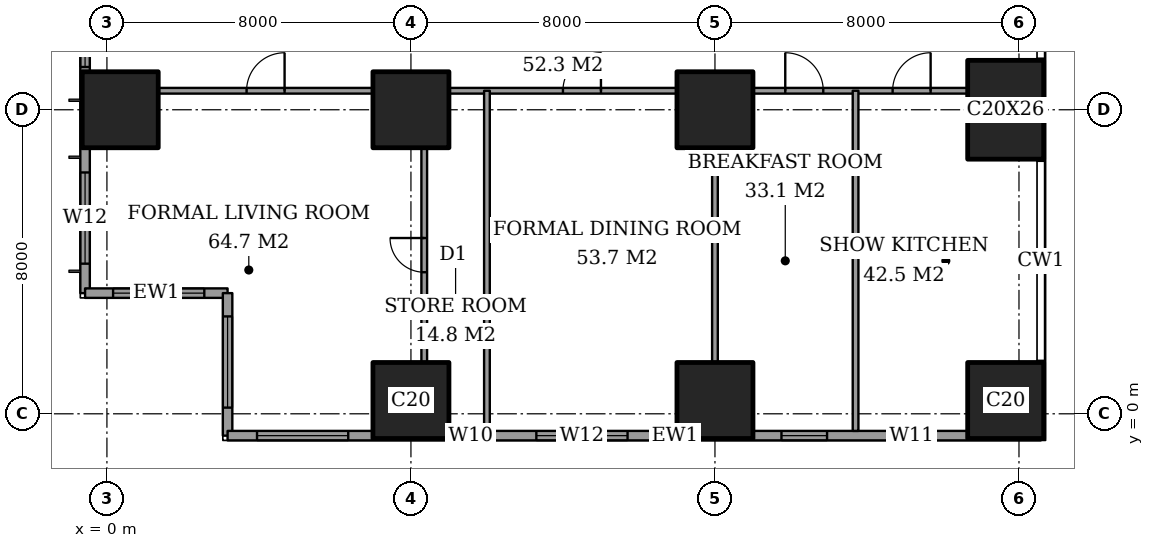
"""IFC4 building model, lengths in metres.
Left out: names, types, materials, properties, quantities, classifications, styles, units other than length and angle.
Written with IfcOpenShell. Run it as: python <this file> out.ifc"""

import sys

from ifc_helpers import new_model, si_unit, direction, frame, frame_2d, origin, origin_2d, place, context, subcontext, project, spatial, rectangle, extrude, element, fill, save


model = new_model("IFC4")
c1 = context("Model", 3, precision=1e-05, world=origin(), true_north=direction((0.0, 1.0)))
c2 = subcontext(c1, "Body", "Model", "MODEL_VIEW")
j1 = project(units=[si_unit("LENGTHUNIT", "METRE"), si_unit("PLANEANGLEUNIT", "RADIAN")], contexts=[c1])
p1 = place(None, origin())
s1 = spatial("IfcSite", under=j1, at=p1, CompositionType="ELEMENT")
p2 = place(p1, origin())
s2 = spatial("IfcBuilding", under=s1, at=p2, CompositionType="ELEMENT")
p3 = place(p2, frame((0.0, 0.0, 121.4)))
s3 = spatial("IfcBuildingStorey", under=s2, at=p3, CompositionType="ELEMENT", Elevation=121.4)
for number, where, z_axis, x_axis in (
    (1, (0.35, 8.0, 0.0), (0.0, 0.0, 1.0), (1.0, 0.0, 0.0)),
    (2, (8.0, 0.35, 0.0), (0.0, 0.0, 1.0), (1.0, 0.0, 0.0)),
    (3, (8.0, 8.0, 0.0), (0.0, 0.0, 1.0), (1.0, 0.0, 0.0)),
    (4, (16.0, 0.35, 0.0), (0.0, 0.0, 1.0), (1.0, 0.0, 0.0)),
    (5, (16.0, 8.0, 0.0), (0.0, 0.0, 1.0), (1.0, 0.0, 0.0)),
    (6, (23.65, 0.35, 0.0), (0.0, 0.0, 1.0), (1.0, 0.0, 0.0)),
):
    element("IfcColumn", number, at=place(p3, frame(where, z_axis=z_axis, x_axis=x_axis)), inside=s3, PredefinedType="COLUMN", context=c2, shape_type="SweptSolid", body=[
        extrude(rectangle(XDim=2.0, YDim=2.0, at=origin_2d()), origin(), (0.0, 0.0, 1.0), 3.6),
    ])
p4 = place(p3, frame((23.65, 8.0, 0.0), z_axis=(0.0, 0.0, 1.0), x_axis=(1.0, 0.0, 0.0)))
e7 = element("IfcColumn", 7, at=p4, inside=s3, PredefinedType="COLUMN", context=c2, shape_type="SweptSolid", body=[
    extrude(rectangle(XDim=2.0, YDim=2.6, at=origin_2d()), origin(), (0.0, 0.0, 1.0), 3.6),
])
p5 = place(p3, frame((-0.575, 44.825, 0.0), z_axis=(0.0, 0.0, 1.0), x_axis=(0.0, -1.0, 0.0)))
e8 = element("IfcWall", 8, at=p5, inside=s3, PredefinedType="SOLIDWALL", context=c2, shape_type="SweptSolid", body=[
    extrude(rectangle(XDim=41.65, YDim=0.25, at=frame_2d((20.825, 0.0))), origin(), (0.0, 0.0, 1.0), 3.6),
])
p6 = place(p5, frame((0.775, 0.0, 0.4)))
e9 = element("IfcOpeningElement", 9, at=p6, cuts=e8, PredefinedType="OPENING", context=c2, shape_type="SweptSolid", body=[
    extrude(rectangle(XDim=2.4, YDim=2.2, at=frame_2d((1.2, 1.1))), frame((0.0, 0.135, 0.0), z_axis=(0.0, -1.0, 0.0), x_axis=(1.0, 0.0, 0.0)), (0.0, 0.0, 1.0), 0.27),
])
p7 = place(p5, frame((6.1, 0.0, 0.4)))
e10 = element("IfcOpeningElement", 10, at=p7, cuts=e8, PredefinedType="OPENING", context=c2, shape_type="SweptSolid", body=[
    extrude(rectangle(XDim=1.2, YDim=2.2, at=frame_2d((0.6, 1.1))), frame((0.0, 0.135, 0.0), z_axis=(0.0, -1.0, 0.0), x_axis=(1.0, 0.0, 0.0)), (0.0, 0.0, 1.0), 0.27),
])
p8 = place(p5, frame((8.225, 0.0, 0.4)))
e11 = element("IfcOpeningElement", 11, at=p8, cuts=e8, PredefinedType="OPENING", context=c2, shape_type="SweptSolid", body=[
    extrude(rectangle(XDim=2.4, YDim=2.2, at=frame_2d((1.2, 1.1))), frame((0.0, 0.135, 0.0), z_axis=(0.0, -1.0, 0.0), x_axis=(1.0, 0.0, 0.0)), (0.0, 0.0, 1.0), 0.27),
])
p9 = place(p5, frame((15.625, 0.0, 0.4)))
e12 = element("IfcOpeningElement", 12, at=p9, cuts=e8, PredefinedType="OPENING", context=c2, shape_type="SweptSolid", body=[
    extrude(rectangle(XDim=2.4, YDim=2.2, at=frame_2d((1.2, 1.1))), frame((0.0, 0.135, 0.0), z_axis=(0.0, -1.0, 0.0), x_axis=(1.0, 0.0, 0.0)), (0.0, 0.0, 1.0), 0.27),
])
p10 = place(p5, frame((23.625, 0.0, 0.4)))
e13 = element("IfcOpeningElement", 13, at=p10, cuts=e8, PredefinedType="OPENING", context=c2, shape_type="SweptSolid", body=[
    extrude(rectangle(XDim=2.4, YDim=2.2, at=frame_2d((1.2, 1.1))), frame((0.0, 0.135, 0.0), z_axis=(0.0, -1.0, 0.0), x_axis=(1.0, 0.0, 0.0)), (0.0, 0.0, 1.0), 0.27),
])
p11 = place(p5, frame((30.825, 0.0, 0.4)))
e14 = element("IfcOpeningElement", 14, at=p11, cuts=e8, PredefinedType="OPENING", context=c2, shape_type="SweptSolid", body=[
    extrude(rectangle(XDim=2.4, YDim=2.2, at=frame_2d((1.2, 1.1))), frame((0.0, 0.135, 0.0), z_axis=(0.0, -1.0, 0.0), x_axis=(1.0, 0.0, 0.0)), (0.0, 0.0, 1.0), 0.27),
])
p12 = place(p5, frame((34.5, 0.0, 0.4)))
e15 = element("IfcOpeningElement", 15, at=p12, cuts=e8, PredefinedType="OPENING", context=c2, shape_type="SweptSolid", body=[
    extrude(rectangle(XDim=1.2, YDim=2.2, at=frame_2d((0.6, 1.1))), frame((0.0, 0.135, 0.0), z_axis=(0.0, -1.0, 0.0), x_axis=(1.0, 0.0, 0.0)), (0.0, 0.0, 1.0), 0.27),
])
p13 = place(p5, frame((38.475, 0.0, 0.4)))
e16 = element("IfcOpeningElement", 16, at=p13, cuts=e8, PredefinedType="OPENING", context=c2, shape_type="SweptSolid", body=[
    extrude(rectangle(XDim=2.4, YDim=2.2, at=frame_2d((1.2, 1.1))), frame((0.0, 0.135, 0.0), z_axis=(0.0, -1.0, 0.0), x_axis=(1.0, 0.0, 0.0)), (0.0, 0.0, 1.0), 0.27),
])
p14 = place(p3, frame((-0.575, 3.175, 0.0), z_axis=(0.0, 0.0, 1.0), x_axis=(1.0, 0.0, 0.0)))
e17 = element("IfcWall", 17, at=p14, inside=s3, PredefinedType="SOLIDWALL", context=c2, shape_type="SweptSolid", body=[
    extrude(rectangle(XDim=3.75, YDim=0.25, at=frame_2d((1.875, 0.0))), origin(), (0.0, 0.0, 1.0), 3.6),
])
p15 = place(p14, frame((0.738, 0.0, 0.4)))
e18 = element("IfcOpeningElement", 18, at=p15, cuts=e17, PredefinedType="OPENING", context=c2, shape_type="SweptSolid", body=[
    extrude(rectangle(XDim=2.4, YDim=2.2, at=frame_2d((1.2, 1.1))), frame((0.0, 0.135, 0.0), z_axis=(0.0, -1.0, 0.0), x_axis=(1.0, 0.0, 0.0)), (0.0, 0.0, 1.0), 0.27),
])
p16 = place(p3, frame((3.175, 3.175, 0.0), z_axis=(0.0, 0.0, 1.0), x_axis=(0.0, -1.0, 0.0)))
e19 = element("IfcWall", 19, at=p16, inside=s3, PredefinedType="SOLIDWALL", context=c2, shape_type="SweptSolid", body=[
    extrude(rectangle(XDim=3.75, YDim=0.25, at=frame_2d((1.875, 0.0))), origin(), (0.0, 0.0, 1.0), 3.6),
])
p17 = place(p16, frame((0.613, 0.0, 0.4)))
e20 = element("IfcOpeningElement", 20, at=p17, cuts=e19, PredefinedType="OPENING", context=c2, shape_type="SweptSolid", body=[
    extrude(rectangle(XDim=2.4, YDim=2.2, at=frame_2d((1.2, 1.1))), frame((0.0, 0.135, 0.0), z_axis=(0.0, -1.0, 0.0), x_axis=(1.0, 0.0, 0.0)), (0.0, 0.0, 1.0), 0.27),
])
p18 = place(p3, frame((3.175, -0.575, 0.0), z_axis=(0.0, 0.0, 1.0), x_axis=(1.0, 0.0, 0.0)))
e21 = element("IfcWall", 21, at=p18, inside=s3, PredefinedType="SOLIDWALL", context=c2, shape_type="SweptSolid", body=[
    extrude(rectangle(XDim=21.4, YDim=0.25, at=frame_2d((10.7, 0.0))), origin(), (0.0, 0.0, 1.0), 3.6),
])
p19 = place(p18, frame((0.775, 0.0, 0.4)))
e22 = element("IfcOpeningElement", 22, at=p19, cuts=e21, PredefinedType="OPENING", context=c2, shape_type="SweptSolid", body=[
    extrude(rectangle(XDim=2.4, YDim=2.2, at=frame_2d((1.2, 1.1))), frame((0.0, 0.135, 0.0), z_axis=(0.0, -1.0, 0.0), x_axis=(1.0, 0.0, 0.0)), (0.0, 0.0, 1.0), 0.27),
])
p20 = place(p18, frame((6.1, 0.0, 0.4)))
e23 = element("IfcOpeningElement", 23, at=p20, cuts=e21, PredefinedType="OPENING", context=c2, shape_type="SweptSolid", body=[
    extrude(rectangle(XDim=0.6, YDim=2.2, at=frame_2d((0.3, 1.1))), frame((0.0, 0.135, 0.0), z_axis=(0.0, -1.0, 0.0), x_axis=(1.0, 0.0, 0.0)), (0.0, 0.0, 1.0), 0.27),
])
p21 = place(p18, frame((8.125, 0.0, 0.4)))
e24 = element("IfcOpeningElement", 24, at=p21, cuts=e21, PredefinedType="OPENING", context=c2, shape_type="SweptSolid", body=[
    extrude(rectangle(XDim=2.4, YDim=2.2, at=frame_2d((1.2, 1.1))), frame((0.0, 0.135, 0.0), z_axis=(0.0, -1.0, 0.0), x_axis=(1.0, 0.0, 0.0)), (0.0, 0.0, 1.0), 0.27),
])
p22 = place(p18, frame((14.575, 0.0, 0.4)))
e25 = element("IfcOpeningElement", 25, at=p22, cuts=e21, PredefinedType="OPENING", context=c2, shape_type="SweptSolid", body=[
    extrude(rectangle(XDim=1.2, YDim=2.2, at=frame_2d((0.6, 1.1))), frame((0.0, 0.135, 0.0), z_axis=(0.0, -1.0, 0.0), x_axis=(1.0, 0.0, 0.0)), (0.0, 0.0, 1.0), 0.27),
])
p23 = place(p18, frame((17.4, 0.0, 0.4)))
e26 = element("IfcOpeningElement", 26, at=p23, cuts=e21, PredefinedType="OPENING", context=c2, shape_type="SweptSolid", body=[
    extrude(rectangle(XDim=1.2, YDim=2.2, at=frame_2d((0.6, 1.1))), frame((0.0, 0.135, 0.0), z_axis=(0.0, -1.0, 0.0), x_axis=(1.0, 0.0, 0.0)), (0.0, 0.0, 1.0), 0.27),
])
p24 = place(p3, frame((1.35, 8.5, 0.0), z_axis=(0.0, 0.0, 1.0), x_axis=(1.0, 0.0, 0.0)))
e27 = element("IfcWall", 27, at=p24, inside=s3, PredefinedType="PARTITIONING", context=c2, shape_type="SweptSolid", body=[
    extrude(rectangle(XDim=5.65, YDim=0.15, at=frame_2d((2.825, 0.0))), origin(), (0.0, 0.0, 1.0), 3.35),
])
p25 = place(p24, frame((2.325, 0.0, 0.0)))
e28 = element("IfcOpeningElement", 28, at=p25, cuts=e27, PredefinedType="OPENING", context=c2, shape_type="SweptSolid", body=[
    extrude(rectangle(XDim=1.0, YDim=2.1, at=frame_2d((0.5, 1.05))), frame((0.0, 0.085, 0.0), z_axis=(0.0, -1.0, 0.0), x_axis=(1.0, 0.0, 0.0)), (0.0, 0.0, 1.0), 0.17),
])
p26 = place(p3, frame((9.0, 8.5, 0.0), z_axis=(0.0, 0.0, 1.0), x_axis=(1.0, 0.0, 0.0)))
e29 = element("IfcWall", 29, at=p26, inside=s3, PredefinedType="PARTITIONING", context=c2, shape_type="SweptSolid", body=[
    extrude(rectangle(XDim=6.0, YDim=0.15, at=frame_2d((3.0, 0.0))), origin(), (0.0, 0.0, 1.0), 3.35),
])
p27 = place(p26, frame((3.0, 0.0, 0.0)))
e30 = element("IfcOpeningElement", 30, at=p27, cuts=e29, PredefinedType="OPENING", context=c2, shape_type="SweptSolid", body=[
    extrude(rectangle(XDim=1.0, YDim=2.1, at=frame_2d((0.5, 1.05))), frame((0.0, 0.085, 0.0), z_axis=(0.0, -1.0, 0.0), x_axis=(1.0, 0.0, 0.0)), (0.0, 0.0, 1.0), 0.17),
])
p28 = place(p3, frame((17.0, 8.5, 0.0), z_axis=(0.0, 0.0, 1.0), x_axis=(1.0, 0.0, 0.0)))
e31 = element("IfcWall", 31, at=p28, inside=s3, PredefinedType="PARTITIONING", context=c2, shape_type="SweptSolid", body=[
    extrude(rectangle(XDim=5.65, YDim=0.15, at=frame_2d((2.825, 0.0))), origin(), (0.0, 0.0, 1.0), 3.35),
])
p29 = place(p28, frame((0.85, 0.0, 0.0)))
e32 = element("IfcOpeningElement", 32, at=p29, cuts=e31, PredefinedType="OPENING", context=c2, shape_type="SweptSolid", body=[
    extrude(rectangle(XDim=1.0, YDim=2.1, at=frame_2d((0.5, 1.05))), frame((0.0, 0.085, 0.0), z_axis=(0.0, -1.0, 0.0), x_axis=(1.0, 0.0, 0.0)), (0.0, 0.0, 1.0), 0.17),
])
p30 = place(p28, frame((3.675, 0.0, 0.0)))
e33 = element("IfcOpeningElement", 33, at=p30, cuts=e31, PredefinedType="OPENING", context=c2, shape_type="SweptSolid", body=[
    extrude(rectangle(XDim=1.0, YDim=2.1, at=frame_2d((0.5, 1.05))), frame((0.0, 0.085, 0.0), z_axis=(0.0, -1.0, 0.0), x_axis=(1.0, 0.0, 0.0)), (0.0, 0.0, 1.0), 0.17),
])
p31 = place(p3, frame((8.35, 1.35, 0.0), z_axis=(0.0, 0.0, 1.0), x_axis=(0.0, 1.0, 0.0)))
e34 = element("IfcWall", 34, at=p31, inside=s3, PredefinedType="PARTITIONING", context=c2, shape_type="SweptSolid", body=[
    extrude(rectangle(XDim=5.65, YDim=0.15, at=frame_2d((2.825, 0.0))), origin(), (0.0, 0.0, 1.0), 3.35),
])
p32 = place(p31, frame((2.375, 0.0, 0.0)))
e35 = element("IfcOpeningElement", 35, at=p32, cuts=e34, PredefinedType="OPENING", context=c2, shape_type="SweptSolid", body=[
    extrude(rectangle(XDim=0.9, YDim=2.1, at=frame_2d((0.45, 1.05))), frame((0.0, 0.085, 0.0), z_axis=(0.0, -1.0, 0.0), x_axis=(1.0, 0.0, 0.0)), (0.0, 0.0, 1.0), 0.17),
])
p33 = place(p3, frame((10.0, -0.45, 0.0), z_axis=(0.0, 0.0, 1.0), x_axis=(0.0, 1.0, 0.0)))
e36 = element("IfcWall", 36, at=p33, inside=s3, PredefinedType="PARTITIONING", context=c2, shape_type="SweptSolid", body=[
    extrude(rectangle(XDim=8.95, YDim=0.15, at=frame_2d((4.475, 0.0))), origin(), (0.0, 0.0, 1.0), 3.35),
])
p34 = place(p3, frame((16.0, 1.35, 0.0), z_axis=(0.0, 0.0, 1.0), x_axis=(0.0, 1.0, 0.0)))
e37 = element("IfcWall", 37, at=p34, inside=s3, PredefinedType="PARTITIONING", context=c2, shape_type="SweptSolid", body=[
    extrude(rectangle(XDim=5.65, YDim=0.15, at=frame_2d((2.825, 0.0))), origin(), (0.0, 0.0, 1.0), 3.35),
])
p35 = place(p3, frame((19.7, -0.45, 0.0), z_axis=(0.0, 0.0, 1.0), x_axis=(0.0, 1.0, 0.0)))
e38 = element("IfcWall", 38, at=p35, inside=s3, PredefinedType="PARTITIONING", context=c2, shape_type="SweptSolid", body=[
    extrude(rectangle(XDim=8.95, YDim=0.15, at=frame_2d((4.475, 0.0))), origin(), (0.0, 0.0, 1.0), 3.35),
])
p36 = place(p12, origin())
e39 = element("IfcWindow", 39, at=p36, inside=s3, PartitioningType="SINGLE_PANEL", PredefinedType="WINDOW", context=c2, shape_type="SweptSolid", body=[
    extrude(rectangle(XDim=1.2, YDim=2.2, at=frame_2d((0.6, 1.1))), frame((0.0, 0.03, 0.0), z_axis=(0.0, -1.0, 0.0), x_axis=(1.0, 0.0, 0.0)), (0.0, 0.0, 1.0), 0.06),
])
fill(e15, e39)
p37 = place(p13, origin())
e40 = element("IfcWindow", 40, at=p37, inside=s3, PartitioningType="SINGLE_PANEL", PredefinedType="WINDOW", context=c2, shape_type="SweptSolid", body=[
    extrude(rectangle(XDim=2.4, YDim=2.2, at=frame_2d((1.2, 1.1))), frame((0.0, 0.03, 0.0), z_axis=(0.0, -1.0, 0.0), x_axis=(1.0, 0.0, 0.0)), (0.0, 0.0, 1.0), 0.06),
])
fill(e16, e40)
p38 = place(p15, origin())
e41 = element("IfcWindow", 41, at=p38, inside=s3, PartitioningType="SINGLE_PANEL", PredefinedType="WINDOW", context=c2, shape_type="SweptSolid", body=[
    extrude(rectangle(XDim=2.4, YDim=2.2, at=frame_2d((1.2, 1.1))), frame((0.0, 0.03, 0.0), z_axis=(0.0, -1.0, 0.0), x_axis=(1.0, 0.0, 0.0)), (0.0, 0.0, 1.0), 0.06),
])
fill(e18, e41)
p39 = place(p17, origin())
e42 = element("IfcWindow", 42, at=p39, inside=s3, PartitioningType="SINGLE_PANEL", PredefinedType="WINDOW", context=c2, shape_type="SweptSolid", body=[
    extrude(rectangle(XDim=2.4, YDim=2.2, at=frame_2d((1.2, 1.1))), frame((0.0, 0.03, 0.0), z_axis=(0.0, -1.0, 0.0), x_axis=(1.0, 0.0, 0.0)), (0.0, 0.0, 1.0), 0.06),
])
fill(e20, e42)
p40 = place(p19, origin())
e43 = element("IfcWindow", 43, at=p40, inside=s3, PartitioningType="SINGLE_PANEL", PredefinedType="WINDOW", context=c2, shape_type="SweptSolid", body=[
    extrude(rectangle(XDim=2.4, YDim=2.2, at=frame_2d((1.2, 1.1))), frame((0.0, 0.03, 0.0), z_axis=(0.0, -1.0, 0.0), x_axis=(1.0, 0.0, 0.0)), (0.0, 0.0, 1.0), 0.06),
])
fill(e22, e43)
p41 = place(p20, origin())
e44 = element("IfcWindow", 44, at=p41, inside=s3, PartitioningType="SINGLE_PANEL", PredefinedType="WINDOW", context=c2, shape_type="SweptSolid", body=[
    extrude(rectangle(XDim=0.6, YDim=2.2, at=frame_2d((0.3, 1.1))), frame((0.0, 0.03, 0.0), z_axis=(0.0, -1.0, 0.0), x_axis=(1.0, 0.0, 0.0)), (0.0, 0.0, 1.0), 0.06),
])
fill(e23, e44)
p42 = place(p21, origin())
e45 = element("IfcWindow", 45, at=p42, inside=s3, PartitioningType="SINGLE_PANEL", PredefinedType="WINDOW", context=c2, shape_type="SweptSolid", body=[
    extrude(rectangle(XDim=2.4, YDim=2.2, at=frame_2d((1.2, 1.1))), frame((0.0, 0.03, 0.0), z_axis=(0.0, -1.0, 0.0), x_axis=(1.0, 0.0, 0.0)), (0.0, 0.0, 1.0), 0.06),
])
fill(e24, e45)
p43 = place(p22, origin())
e46 = element("IfcWindow", 46, at=p43, inside=s3, PartitioningType="SINGLE_PANEL", PredefinedType="WINDOW", context=c2, shape_type="SweptSolid", body=[
    extrude(rectangle(XDim=1.2, YDim=2.2, at=frame_2d((0.6, 1.1))), frame((0.0, 0.03, 0.0), z_axis=(0.0, -1.0, 0.0), x_axis=(1.0, 0.0, 0.0)), (0.0, 0.0, 1.0), 0.06),
])
fill(e25, e46)
p44 = place(p23, origin())
e47 = element("IfcWindow", 47, at=p44, inside=s3, PartitioningType="SINGLE_PANEL", PredefinedType="WINDOW", context=c2, shape_type="SweptSolid", body=[
    extrude(rectangle(XDim=1.2, YDim=2.2, at=frame_2d((0.6, 1.1))), frame((0.0, 0.03, 0.0), z_axis=(0.0, -1.0, 0.0), x_axis=(1.0, 0.0, 0.0)), (0.0, 0.0, 1.0), 0.06),
])
fill(e26, e47)
p45 = place(p25, origin())
e48 = element("IfcDoor", 48, at=p45, inside=s3, OperationType="SINGLE_SWING_LEFT", PredefinedType="DOOR", context=c2, shape_type="SweptSolid", body=[
    extrude(rectangle(XDim=1.0, YDim=2.1, at=frame_2d((0.5, 1.05))), frame((0.0, 0.025, 0.0), z_axis=(0.0, -1.0, 0.0), x_axis=(1.0, 0.0, 0.0)), (0.0, 0.0, 1.0), 0.05),
])
fill(e28, e48)
p46 = place(p32, origin())
e49 = element("IfcDoor", 49, at=p46, inside=s3, OperationType="SINGLE_SWING_LEFT", PredefinedType="DOOR", context=c2, shape_type="SweptSolid", body=[
    extrude(rectangle(XDim=0.9, YDim=2.1, at=frame_2d((0.45, 1.05))), frame((0.0, 0.025, 0.0), z_axis=(0.0, -1.0, 0.0), x_axis=(1.0, 0.0, 0.0)), (0.0, 0.0, 1.0), 0.05),
])
fill(e35, e49)
p47 = place(p27, origin())
e50 = element("IfcDoor", 50, at=p47, inside=s3, OperationType="SINGLE_SWING_LEFT", PredefinedType="DOOR", context=c2, shape_type="SweptSolid", body=[
    extrude(rectangle(XDim=1.0, YDim=2.1, at=frame_2d((0.5, 1.05))), frame((0.0, 0.025, 0.0), z_axis=(0.0, -1.0, 0.0), x_axis=(1.0, 0.0, 0.0)), (0.0, 0.0, 1.0), 0.05),
])
fill(e30, e50)
p48 = place(p29, origin())
e51 = element("IfcDoor", 51, at=p48, inside=s3, OperationType="SINGLE_SWING_RIGHT", PredefinedType="DOOR", context=c2, shape_type="SweptSolid", body=[
    extrude(rectangle(XDim=1.0, YDim=2.1, at=frame_2d((0.5, 1.05))), frame((0.0, 0.025, 0.0), z_axis=(0.0, -1.0, 0.0), x_axis=(1.0, 0.0, 0.0)), (0.0, 0.0, 1.0), 0.05),
])
fill(e32, e51)
p49 = place(p30, origin())
e52 = element("IfcDoor", 52, at=p49, inside=s3, OperationType="SINGLE_SWING_LEFT", PredefinedType="DOOR", context=c2, shape_type="SweptSolid", body=[
    extrude(rectangle(XDim=1.0, YDim=2.1, at=frame_2d((0.5, 1.05))), frame((0.0, 0.025, 0.0), z_axis=(0.0, -1.0, 0.0), x_axis=(1.0, 0.0, 0.0)), (0.0, 0.0, 1.0), 0.05),
])
fill(e33, e52)
save(model, sys.argv[1])
